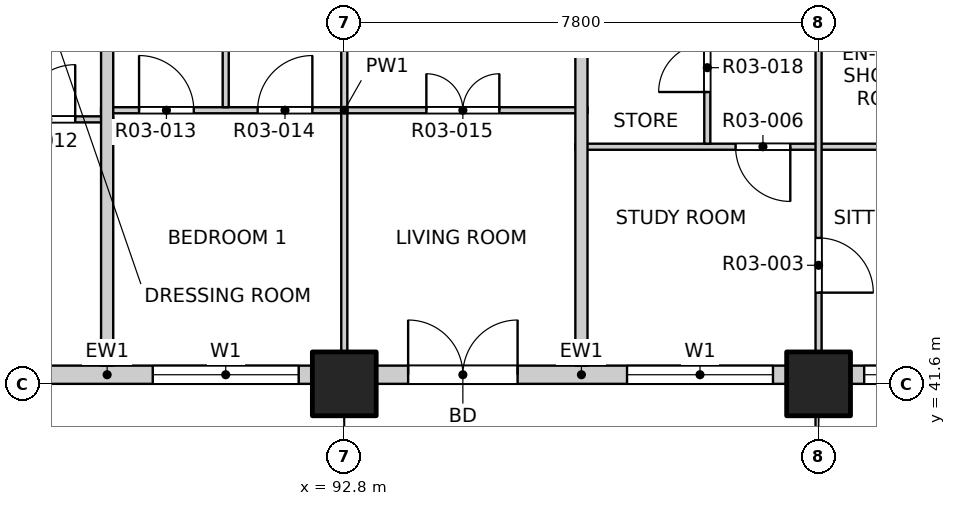
"""IFC4 building model, lengths in metres.
Left out: names, types, materials, properties, quantities, classifications, styles, units other than length and angle.
Written with IfcOpenShell. Run it as: python <this file> out.ifc"""

import sys

from ifc_helpers import new_model, si_unit, direction, frame, frame_2d, origin, origin_2d, place, context, subcontext, project, spatial, rectangle, extrude, element, fill, save


model = new_model("IFC4")
c1 = context("Model", 3, precision=1e-05, world=origin(), true_north=direction((0.0, 1.0)))
c2 = subcontext(c1, "Body", "Model", "MODEL_VIEW")
j1 = project(units=[si_unit("LENGTHUNIT", "METRE"), si_unit("PLANEANGLEUNIT", "RADIAN")], contexts=[c1])
p1 = place(None, origin())
s1 = spatial("IfcSite", under=j1, at=p1, CompositionType="ELEMENT")
p2 = place(p1, origin())
s2 = spatial("IfcBuilding", under=s1, at=p2, CompositionType="ELEMENT")
p3 = place(p2, frame((0.0, 0.0, 39.9)))
s3 = spatial("IfcBuildingStorey", under=s2, at=p3, CompositionType="ELEMENT", Elevation=39.9)
for number, where, z_axis, x_axis in (
    (1, (92.8, 41.6, -0.25), (0.0, 0.0, 1.0), (1.0, 0.0, 0.0)),
    (2, (100.6, 41.6, -0.25), (0.0, 0.0, 1.0), (1.0, 0.0, 0.0)),
):
    element("IfcColumn", number, at=place(p3, frame(where, z_axis=z_axis, x_axis=x_axis)), inside=s3, PredefinedType="COLUMN", context=c2, shape_type="SweptSolid", body=[
        extrude(rectangle(XDim=1.05, YDim=1.05, at=origin_2d()), origin(), (0.0, 0.0, 1.0), 3.4),
    ])
p4 = place(p3, frame((85.525, 41.75, 0.0), z_axis=(0.0, 0.0, 1.0), x_axis=(1.0, 0.0, 0.0)))
e3 = element("IfcWall", 3, at=p4, inside=s3, PredefinedType="SOLIDWALL", context=c2, shape_type="SweptSolid", body=[
    extrude(rectangle(XDim=6.75, YDim=0.3, at=frame_2d((3.375, 0.0))), origin(), (0.0, 0.0, 1.0), 2.7),
])
p5 = place(p4, frame((0.525, 0.0, 0.0)))
e4 = element("IfcOpeningElement", 4, at=p5, cuts=e3, PredefinedType="OPENING", context=c2, shape_type="SweptSolid", body=[
    extrude(rectangle(XDim=1.8, YDim=2.4, at=frame_2d((0.9, 1.2))), frame((0.0, 0.16, 0.0), z_axis=(0.0, -1.0, 0.0), x_axis=(1.0, 0.0, 0.0)), (0.0, 0.0, 1.0), 0.32),
])
p6 = place(p4, frame((4.125, 0.0, 0.9)))
e5 = element("IfcOpeningElement", 5, at=p6, cuts=e3, PredefinedType="OPENING", context=c2, shape_type="SweptSolid", body=[
    extrude(rectangle(XDim=2.4, YDim=1.8, at=frame_2d((1.2, 0.9))), frame((0.0, 0.16, 0.0), z_axis=(0.0, -1.0, 0.0), x_axis=(1.0, 0.0, 0.0)), (0.0, 0.0, 1.0), 0.32),
])
p7 = place(p3, frame((93.325, 41.75, 0.0), z_axis=(0.0, 0.0, 1.0), x_axis=(1.0, 0.0, 0.0)))
e6 = element("IfcWall", 6, at=p7, inside=s3, PredefinedType="SOLIDWALL", context=c2, shape_type="SweptSolid", body=[
    extrude(rectangle(XDim=6.75, YDim=0.3, at=frame_2d((3.375, 0.0))), origin(), (0.0, 0.0, 1.0), 2.7),
])
p8 = place(p7, frame((0.525, 0.0, 0.0)))
e7 = element("IfcOpeningElement", 7, at=p8, cuts=e6, PredefinedType="OPENING", context=c2, shape_type="SweptSolid", body=[
    extrude(rectangle(XDim=1.8, YDim=2.4, at=frame_2d((0.9, 1.2))), frame((0.0, 0.16, 0.0), z_axis=(0.0, -1.0, 0.0), x_axis=(1.0, 0.0, 0.0)), (0.0, 0.0, 1.0), 0.32),
])
p9 = place(p7, frame((4.125, 0.0, 0.9)))
e8 = element("IfcOpeningElement", 8, at=p9, cuts=e6, PredefinedType="OPENING", context=c2, shape_type="SweptSolid", body=[
    extrude(rectangle(XDim=2.4, YDim=1.8, at=frame_2d((1.2, 0.9))), frame((0.0, 0.16, 0.0), z_axis=(0.0, -1.0, 0.0), x_axis=(1.0, 0.0, 0.0)), (0.0, 0.0, 1.0), 0.32),
])
p10 = place(p3, frame((101.125, 41.75, 0.0), z_axis=(0.0, 0.0, 1.0), x_axis=(1.0, 0.0, 0.0)))
e9 = element("IfcWall", 9, at=p10, inside=s3, PredefinedType="SOLIDWALL", context=c2, shape_type="SweptSolid", body=[
    extrude(rectangle(XDim=3.375, YDim=0.3, at=frame_2d((1.688, 0.0))), origin(), (0.0, 0.0, 1.0), 2.7),
])
p11 = place(p10, frame((0.225, 0.0, 0.9)))
e10 = element("IfcOpeningElement", 10, at=p11, cuts=e9, PredefinedType="OPENING", context=c2, shape_type="SweptSolid", body=[
    extrude(rectangle(XDim=2.4, YDim=1.8, at=frame_2d((1.2, 0.9))), frame((0.0, 0.16, 0.0), z_axis=(0.0, -1.0, 0.0), x_axis=(1.0, 0.0, 0.0)), (0.0, 0.0, 1.0), 0.32),
])
p12 = place(p3, frame((96.6, 45.5, 0.0), z_axis=(0.0, 0.0, 1.0), x_axis=(1.0, 0.0, 0.0)))
e11 = element("IfcWall", 11, at=p12, inside=s3, PredefinedType="PARTITIONING", context=c2, shape_type="SweptSolid", body=[
    extrude(rectangle(XDim=11.5, YDim=0.1, at=frame_2d((5.75, 0.0))), origin(), (0.0, 0.0, 1.0), 3.15),
])
p13 = place(p12, frame((2.635, 0.0, 0.0)))
e12 = element("IfcOpeningElement", 12, at=p13, cuts=e11, PredefinedType="OPENING", context=c2, shape_type="SweptSolid", body=[
    extrude(rectangle(XDim=0.9, YDim=2.1, at=frame_2d((0.45, 1.05))), frame((0.0, 0.06, 0.0), z_axis=(0.0, -1.0, 0.0), x_axis=(1.0, 0.0, 0.0)), (0.0, 0.0, 1.0), 0.12),
])
p14 = place(p3, frame((81.0, 45.95, 0.0), z_axis=(0.0, 0.0, 1.0), x_axis=(1.0, 0.0, 0.0)))
e13 = element("IfcWall", 13, at=p14, inside=s3, PredefinedType="PARTITIONING", context=c2, shape_type="SweptSolid", body=[
    extrude(rectangle(XDim=8.0, YDim=0.1, at=frame_2d((4.0, 0.0))), origin(), (0.0, 0.0, 1.0), 3.15),
])
p15 = place(p14, frame((1.45, 0.0, 0.0)))
e14 = element("IfcOpeningElement", 14, at=p15, cuts=e13, PredefinedType="OPENING", context=c2, shape_type="SweptSolid", body=[
    extrude(rectangle(XDim=1.2, YDim=2.1, at=frame_2d((0.6, 1.05))), frame((0.0, 0.06, 0.0), z_axis=(0.0, -1.0, 0.0), x_axis=(1.0, 0.0, 0.0)), (0.0, 0.0, 1.0), 0.12),
])
p16 = place(p14, frame((4.525, 0.0, 0.0)))
e15 = element("IfcOpeningElement", 15, at=p16, cuts=e13, PredefinedType="OPENING", context=c2, shape_type="SweptSolid", body=[
    extrude(rectangle(XDim=0.9, YDim=2.1, at=frame_2d((0.45, 1.05))), frame((0.0, 0.06, 0.0), z_axis=(0.0, -1.0, 0.0), x_axis=(1.0, 0.0, 0.0)), (0.0, 0.0, 1.0), 0.12),
])
p17 = place(p14, frame((6.475, 0.0, 0.0)))
e16 = element("IfcOpeningElement", 16, at=p17, cuts=e13, PredefinedType="OPENING", context=c2, shape_type="SweptSolid", body=[
    extrude(rectangle(XDim=0.9, YDim=2.1, at=frame_2d((0.45, 1.05))), frame((0.0, 0.06, 0.0), z_axis=(0.0, -1.0, 0.0), x_axis=(1.0, 0.0, 0.0)), (0.0, 0.0, 1.0), 0.12),
])
p18 = place(p3, frame((88.8, 46.1, 0.0), z_axis=(0.0, 0.0, 1.0), x_axis=(1.0, 0.0, 0.0)))
e17 = element("IfcWall", 17, at=p18, inside=s3, PredefinedType="PARTITIONING", context=c2, shape_type="SweptSolid", body=[
    extrude(rectangle(XDim=8.0, YDim=0.1, at=frame_2d((4.0, 0.0))), origin(), (0.0, 0.0, 1.0), 3.15),
])
p19 = place(p18, frame((0.625, 0.0, 0.0)))
e18 = element("IfcOpeningElement", 18, at=p19, cuts=e17, PredefinedType="OPENING", context=c2, shape_type="SweptSolid", body=[
    extrude(rectangle(XDim=0.9, YDim=2.1, at=frame_2d((0.45, 1.05))), frame((0.0, 0.06, 0.0), z_axis=(0.0, -1.0, 0.0), x_axis=(1.0, 0.0, 0.0)), (0.0, 0.0, 1.0), 0.12),
])
p20 = place(p18, frame((2.575, 0.0, 0.0)))
e19 = element("IfcOpeningElement", 19, at=p20, cuts=e17, PredefinedType="OPENING", context=c2, shape_type="SweptSolid", body=[
    extrude(rectangle(XDim=0.9, YDim=2.1, at=frame_2d((0.45, 1.05))), frame((0.0, 0.06, 0.0), z_axis=(0.0, -1.0, 0.0), x_axis=(1.0, 0.0, 0.0)), (0.0, 0.0, 1.0), 0.12),
])
p21 = place(p18, frame((5.35, 0.0, 0.0)))
e20 = element("IfcOpeningElement", 20, at=p21, cuts=e17, PredefinedType="OPENING", context=c2, shape_type="SweptSolid", body=[
    extrude(rectangle(XDim=1.2, YDim=2.1, at=frame_2d((0.6, 1.05))), frame((0.0, 0.06, 0.0), z_axis=(0.0, -1.0, 0.0), x_axis=(1.0, 0.0, 0.0)), (0.0, 0.0, 1.0), 0.12),
])
p22 = place(p3, frame((88.9, 41.9, 0.0), z_axis=(0.0, 0.0, 1.0), x_axis=(0.0, 1.0, 0.0)))
e21 = element("IfcWall", 21, at=p22, inside=s3, PredefinedType="PARTITIONING", context=c2, shape_type="SweptSolid", body=[
    extrude(rectangle(XDim=11.3, YDim=0.2, at=frame_2d((5.65, 0.0))), origin(), (0.0, 0.0, 1.0), 3.15),
])
p23 = place(p3, frame((90.85, 46.15, 0.0), z_axis=(0.0, 0.0, 1.0), x_axis=(0.0, 1.0, 0.0)))
e22 = element("IfcWall", 22, at=p23, inside=s3, PredefinedType="PARTITIONING", context=c2, shape_type="SweptSolid", body=[
    extrude(rectangle(XDim=3.2, YDim=0.1, at=frame_2d((1.6, 0.0))), origin(), (0.0, 0.0, 1.0), 3.15),
])
p24 = place(p3, frame((92.8, 41.9, 0.0), z_axis=(0.0, 0.0, 1.0), x_axis=(0.0, 1.0, 0.0)))
e23 = element("IfcWall", 23, at=p24, inside=s3, PredefinedType="PARTITIONING", context=c2, shape_type="SweptSolid", body=[
    extrude(rectangle(XDim=7.45, YDim=0.1, at=frame_2d((3.725, 0.0))), origin(), (0.0, 0.0, 1.0), 2.55),
])
p25 = place(p3, frame((96.7, 41.9, 0.0), z_axis=(0.0, 0.0, 1.0), x_axis=(0.0, 1.0, 0.0)))
e24 = element("IfcWall", 24, at=p25, inside=s3, PredefinedType="PARTITIONING", context=c2, shape_type="SweptSolid", body=[
    extrude(rectangle(XDim=11.3, YDim=0.2, at=frame_2d((5.65, 0.0))), origin(), (0.0, 0.0, 1.0), 3.15),
])
p26 = place(p3, frame((98.77, 45.55, 0.0), z_axis=(0.0, 0.0, 1.0), x_axis=(0.0, 1.0, 0.0)))
e25 = element("IfcWall", 25, at=p26, inside=s3, PredefinedType="PARTITIONING", context=c2, shape_type="SweptSolid", body=[
    extrude(rectangle(XDim=9.85, YDim=0.1, at=frame_2d((4.925, 0.0))), origin(), (0.0, 0.0, 1.0), 3.15),
])
p27 = place(p26, frame((0.85, 0.0, 0.0)))
e26 = element("IfcOpeningElement", 26, at=p27, cuts=e25, PredefinedType="OPENING", context=c2, shape_type="SweptSolid", body=[
    extrude(rectangle(XDim=0.8, YDim=2.1, at=frame_2d((0.4, 1.05))), frame((0.0, 0.06, 0.0), z_axis=(0.0, -1.0, 0.0), x_axis=(1.0, 0.0, 0.0)), (0.0, 0.0, 1.0), 0.12),
])
p28 = place(p26, frame((3.3, 0.0, 0.0)))
e27 = element("IfcOpeningElement", 27, at=p28, cuts=e25, PredefinedType="OPENING", context=c2, shape_type="SweptSolid", body=[
    extrude(rectangle(XDim=0.9, YDim=2.1, at=frame_2d((0.45, 1.05))), frame((0.0, 0.06, 0.0), z_axis=(0.0, -1.0, 0.0), x_axis=(1.0, 0.0, 0.0)), (0.0, 0.0, 1.0), 0.12),
])
p29 = place(p26, frame((5.725, 0.0, 0.0)))
e28 = element("IfcOpeningElement", 28, at=p29, cuts=e25, PredefinedType="OPENING", context=c2, shape_type="SweptSolid", body=[
    extrude(rectangle(XDim=0.8, YDim=2.1, at=frame_2d((0.4, 1.05))), frame((0.0, 0.06, 0.0), z_axis=(0.0, -1.0, 0.0), x_axis=(1.0, 0.0, 0.0)), (0.0, 0.0, 1.0), 0.12),
])
p30 = place(p26, frame((8.2, 0.0, 0.0)))
e29 = element("IfcOpeningElement", 29, at=p30, cuts=e25, PredefinedType="OPENING", context=c2, shape_type="SweptSolid", body=[
    extrude(rectangle(XDim=0.8, YDim=2.1, at=frame_2d((0.4, 1.05))), frame((0.0, 0.06, 0.0), z_axis=(0.0, -1.0, 0.0), x_axis=(1.0, 0.0, 0.0)), (0.0, 0.0, 1.0), 0.12),
])
p31 = place(p3, frame((100.6, 41.9, 0.0), z_axis=(0.0, 0.0, 1.0), x_axis=(0.0, 1.0, 0.0)))
e30 = element("IfcWall", 30, at=p31, inside=s3, PredefinedType="PARTITIONING", context=c2, shape_type="SweptSolid", body=[
    extrude(rectangle(XDim=7.5, YDim=0.1, at=frame_2d((3.75, 0.0))), origin(), (0.0, 0.0, 1.0), 2.55),
])
p32 = place(p31, frame((1.2, 0.0, 0.0)))
e31 = element("IfcOpeningElement", 31, at=p32, cuts=e30, PredefinedType="OPENING", context=c2, shape_type="SweptSolid", body=[
    extrude(rectangle(XDim=0.9, YDim=2.1, at=frame_2d((0.45, 1.05))), frame((0.0, 0.06, 0.0), z_axis=(0.0, -1.0, 0.0), x_axis=(1.0, 0.0, 0.0)), (0.0, 0.0, 1.0), 0.12),
])
p33 = place(p31, frame((5.9, 0.0, 0.0)))
e32 = element("IfcOpeningElement", 32, at=p33, cuts=e30, PredefinedType="OPENING", context=c2, shape_type="SweptSolid", body=[
    extrude(rectangle(XDim=0.9, YDim=2.1, at=frame_2d((0.45, 1.05))), frame((0.0, 0.06, 0.0), z_axis=(0.0, -1.0, 0.0), x_axis=(1.0, 0.0, 0.0)), (0.0, 0.0, 1.0), 0.12),
])
p34 = place(p6, origin())
e33 = element("IfcWindow", 33, at=p34, inside=s3, PartitioningType="DOUBLE_PANEL_VERTICAL", PredefinedType="WINDOW", context=c2, shape_type="SweptSolid", body=[
    extrude(rectangle(XDim=2.4, YDim=1.8, at=frame_2d((1.2, 0.9))), frame((0.0, 0.03, 0.0), z_axis=(0.0, -1.0, 0.0), x_axis=(1.0, 0.0, 0.0)), (0.0, 0.0, 1.0), 0.06),
])
fill(e5, e33)
p35 = place(p8, origin())
e34 = element("IfcDoor", 34, at=p35, inside=s3, OperationType="DOUBLE_DOOR_SINGLE_SWING", PredefinedType="DOOR", context=c2, shape_type="SweptSolid", body=[
    extrude(rectangle(XDim=1.8, YDim=2.4, at=frame_2d((0.9, 1.2))), frame((0.0, 0.025, 0.0), z_axis=(0.0, -1.0, 0.0), x_axis=(1.0, 0.0, 0.0)), (0.0, 0.0, 1.0), 0.05),
])
fill(e7, e34)
p36 = place(p9, origin())
e35 = element("IfcWindow", 35, at=p36, inside=s3, PartitioningType="DOUBLE_PANEL_VERTICAL", PredefinedType="WINDOW", context=c2, shape_type="SweptSolid", body=[
    extrude(rectangle(XDim=2.4, YDim=1.8, at=frame_2d((1.2, 0.9))), frame((0.0, 0.03, 0.0), z_axis=(0.0, -1.0, 0.0), x_axis=(1.0, 0.0, 0.0)), (0.0, 0.0, 1.0), 0.06),
])
fill(e8, e35)
p37 = place(p11, origin())
e36 = element("IfcWindow", 36, at=p37, inside=s3, PartitioningType="DOUBLE_PANEL_VERTICAL", PredefinedType="WINDOW", context=c2, shape_type="SweptSolid", body=[
    extrude(rectangle(XDim=2.4, YDim=1.8, at=frame_2d((1.2, 0.9))), frame((0.0, 0.03, 0.0), z_axis=(0.0, -1.0, 0.0), x_axis=(1.0, 0.0, 0.0)), (0.0, 0.0, 1.0), 0.06),
])
fill(e10, e36)
p38 = place(p32, origin())
e37 = element("IfcDoor", 37, at=p38, inside=s3, OperationType="SINGLE_SWING_RIGHT", PredefinedType="DOOR", context=c2, shape_type="SweptSolid", body=[
    extrude(rectangle(XDim=0.9, YDim=2.1, at=frame_2d((0.45, 1.05))), frame((0.0, 0.025, 0.0), z_axis=(0.0, -1.0, 0.0), x_axis=(1.0, 0.0, 0.0)), (0.0, 0.0, 1.0), 0.05),
])
fill(e31, e37)
p39 = place(p13, origin())
e38 = element("IfcDoor", 38, at=p39, inside=s3, OperationType="SINGLE_SWING_LEFT", PredefinedType="DOOR", context=c2, shape_type="SweptSolid", body=[
    extrude(rectangle(XDim=0.9, YDim=2.1, at=frame_2d((0.45, 1.05))), frame((0.0, 0.025, 0.0), z_axis=(0.0, -1.0, 0.0), x_axis=(1.0, 0.0, 0.0)), (0.0, 0.0, 1.0), 0.05),
])
fill(e12, e38)
p40 = place(p17, origin())
e39 = element("IfcDoor", 39, at=p40, inside=s3, OperationType="SINGLE_SWING_RIGHT", PredefinedType="DOOR", context=c2, shape_type="SweptSolid", body=[
    extrude(rectangle(XDim=0.9, YDim=2.1, at=frame_2d((0.45, 1.05))), frame((0.0, 0.025, 0.0), z_axis=(0.0, -1.0, 0.0), x_axis=(1.0, 0.0, 0.0)), (0.0, 0.0, 1.0), 0.05),
])
fill(e16, e39)
p41 = place(p19, origin())
e40 = element("IfcDoor", 40, at=p41, inside=s3, OperationType="SINGLE_SWING_LEFT", PredefinedType="DOOR", context=c2, shape_type="SweptSolid", body=[
    extrude(rectangle(XDim=0.9, YDim=2.1, at=frame_2d((0.45, 1.05))), frame((0.0, 0.025, 0.0), z_axis=(0.0, -1.0, 0.0), x_axis=(1.0, 0.0, 0.0)), (0.0, 0.0, 1.0), 0.05),
])
fill(e18, e40)
p42 = place(p20, origin())
e41 = element("IfcDoor", 41, at=p42, inside=s3, OperationType="SINGLE_SWING_RIGHT", PredefinedType="DOOR", context=c2, shape_type="SweptSolid", body=[
    extrude(rectangle(XDim=0.9, YDim=2.1, at=frame_2d((0.45, 1.05))), frame((0.0, 0.025, 0.0), z_axis=(0.0, -1.0, 0.0), x_axis=(1.0, 0.0, 0.0)), (0.0, 0.0, 1.0), 0.05),
])
fill(e19, e41)
p43 = place(p21, origin())
e42 = element("IfcDoor", 42, at=p43, inside=s3, OperationType="DOUBLE_DOOR_SINGLE_SWING", PredefinedType="DOOR", context=c2, shape_type="SweptSolid", body=[
    extrude(rectangle(XDim=1.2, YDim=2.1, at=frame_2d((0.6, 1.05))), frame((0.0, 0.025, 0.0), z_axis=(0.0, -1.0, 0.0), x_axis=(1.0, 0.0, 0.0)), (0.0, 0.0, 1.0), 0.05),
])
fill(e20, e42)
p44 = place(p27, origin())
e43 = element("IfcDoor", 43, at=p44, inside=s3, OperationType="SINGLE_SWING_LEFT", PredefinedType="DOOR", context=c2, shape_type="SweptSolid", body=[
    extrude(rectangle(XDim=0.8, YDim=2.1, at=frame_2d((0.4, 1.05))), frame((0.0, 0.025, 0.0), z_axis=(0.0, -1.0, 0.0), x_axis=(1.0, 0.0, 0.0)), (0.0, 0.0, 1.0), 0.05),
])
fill(e26, e43)
save(model, sys.argv[1])
